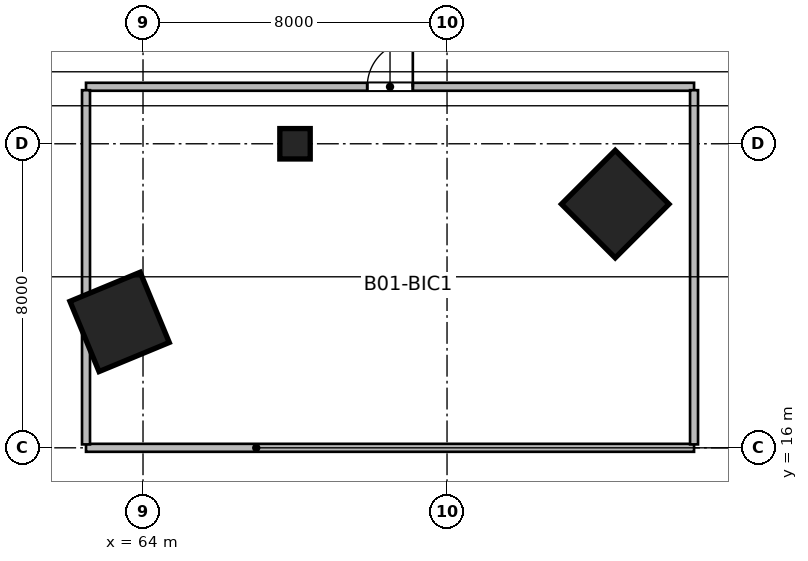
"""IFC4 building model, lengths in metres.
Left out: names, types, materials, properties, quantities, classifications, styles, units other than length and angle.
Written with IfcOpenShell. Run it as: python <this file> out.ifc"""

import sys

from ifc_helpers import new_model, si_unit, direction, frame, frame_2d, origin, origin_2d, place, context, subcontext, project, spatial, rectangle, extrude, source, transform, mapped, element, fill, save


model = new_model("IFC4")
c1 = context("Model", 3, precision=1e-05, world=origin(), true_north=direction((0.0, 1.0)))
c2 = subcontext(c1, "Body", "Model", "MODEL_VIEW")
j1 = project(units=[si_unit("LENGTHUNIT", "METRE"), si_unit("PLANEANGLEUNIT", "RADIAN")], contexts=[c1])
p1 = place(None, origin())
s1 = spatial("IfcSite", under=j1, at=p1, CompositionType="ELEMENT")
p2 = place(p1, origin())
s2 = spatial("IfcBuilding", under=s1, at=p2, CompositionType="ELEMENT")
p3 = place(p2, frame((0.0, 0.0, -5.0)))
s3 = spatial("IfcBuildingStorey", under=s2, at=p3, CompositionType="ELEMENT", Elevation=-5.0)
m1 = source(origin(), c2, "Body", "SweptSolid", [
    extrude(rectangle(XDim=2.0, YDim=2.0, at=origin_2d()), origin(), (0.0, 0.0, 1.0), 5.0),
])
for number, where, z_axis, x_axis in (
    (1, (63.384, 19.312, 0.0), (0.0, 0.0, 1.0), (0.383, -0.924, 0.0)),
    (2, (76.426, 22.412, 0.0), (0.0, 0.0, 1.0), (0.707, -0.707, 0.0)),
):
    element("IfcColumn", number, at=place(p3, frame(where, z_axis=z_axis, x_axis=x_axis)), inside=s3, PredefinedType="COLUMN", context=c2, shape_type="MappedRepresentation", body=[
        mapped(m1, transform((0.0, 0.0, 0.0), scale=1.0)),
    ])
m2 = source(origin(), c2, "Body", "SweptSolid", [
    extrude(rectangle(XDim=0.8, YDim=0.8, at=origin_2d()), origin(), (0.0, 0.0, 1.0), 5.0),
])
p4 = place(p3, frame((68.0, 24.0, 0.0), z_axis=(0.0, 0.0, 1.0), x_axis=(1.0, 0.0, 0.0)))
e3 = element("IfcColumn", 3, at=p4, inside=s3, PredefinedType="COLUMN", context=c2, shape_type="MappedRepresentation", body=[
    mapped(m2, transform((0.0, 0.0, 0.0), scale=1.0)),
])
m3 = source(origin(), c2, "Body", "SweptSolid", [
    extrude(rectangle(XDim=16.0, YDim=0.21, at=frame_2d((8.0, 0.0))), origin(), (0.0, 0.0, 1.0), 4.7),
])
p5 = place(p3, frame((62.5, 16.0, 0.0), z_axis=(0.0, 0.0, 1.0), x_axis=(1.0, 0.0, 0.0)))
e4 = element("IfcWall", 4, at=p5, inside=s3, PredefinedType="PARTITIONING", context=c2, shape_type="MappedRepresentation", body=[
    mapped(m3, transform((0.0, 0.0, 0.0), scale=1.0)),
])
p6 = place(p3, frame((62.5, 25.5, 0.0), z_axis=(0.0, 0.0, 1.0), x_axis=(1.0, 0.0, 0.0)))
e5 = element("IfcWall", 5, at=p6, inside=s3, PredefinedType="PARTITIONING", context=c2, shape_type="MappedRepresentation", body=[
    mapped(m3, transform((0.0, 0.0, 0.0), scale=1.0)),
])
p7 = place(p6, frame((7.4, 0.0, 0.0)))
e6 = element("IfcOpeningElement", 6, at=p7, cuts=e5, PredefinedType="OPENING", context=c2, shape_type="SweptSolid", body=[
    extrude(rectangle(XDim=1.2, YDim=2.15, at=frame_2d((0.6, 1.075))), frame((0.0, 0.115, 0.0), z_axis=(0.0, -1.0, 0.0), x_axis=(1.0, 0.0, 0.0)), (0.0, 0.0, 1.0), 0.23),
])
m4 = source(origin(), c2, "Body", "SweptSolid", [
    extrude(rectangle(XDim=9.32, YDim=0.21, at=frame_2d((4.66, 0.0))), origin(), (0.0, 0.0, 1.0), 3.78),
])
p8 = place(p3, frame((62.5, 16.09, 0.0), z_axis=(0.0, 0.0, 1.0), x_axis=(0.0, 1.0, 0.0)))
e7 = element("IfcWall", 7, at=p8, inside=s3, PredefinedType="PARTITIONING", context=c2, shape_type="MappedRepresentation", body=[
    mapped(m4, transform((0.0, 0.0, 0.0), scale=1.0)),
])
m5 = source(origin(), c2, "Body", "SweptSolid", [
    extrude(rectangle(XDim=9.32, YDim=0.21, at=frame_2d((4.66, 0.0))), origin(), (0.0, 0.0, 1.0), 4.7),
])
p9 = place(p3, frame((78.5, 16.09, 0.0), z_axis=(0.0, 0.0, 1.0), x_axis=(0.0, 1.0, 0.0)))
e8 = element("IfcWall", 8, at=p9, inside=s3, PredefinedType="PARTITIONING", context=c2, shape_type="MappedRepresentation", body=[
    mapped(m5, transform((0.0, 0.0, 0.0), scale=1.0)),
])
m6 = source(origin(), c2, "Body", "SweptSolid", [
    extrude(rectangle(XDim=1.2, YDim=2.15, at=frame_2d((0.6, 1.075))), frame((0.0, 0.025, 0.0), z_axis=(0.0, -1.0, 0.0), x_axis=(1.0, 0.0, 0.0)), (0.0, 0.0, 1.0), 0.05),
])
p10 = place(p7, origin())
e9 = element("IfcDoor", 9, at=p10, inside=s3, OperationType="SINGLE_SWING_RIGHT", PredefinedType="DOOR", context=c2, shape_type="MappedRepresentation", body=[
    mapped(m6, transform((0.0, 0.0, 0.0), scale=1.0)),
])
fill(e6, e9)
save(model, sys.argv[1])
